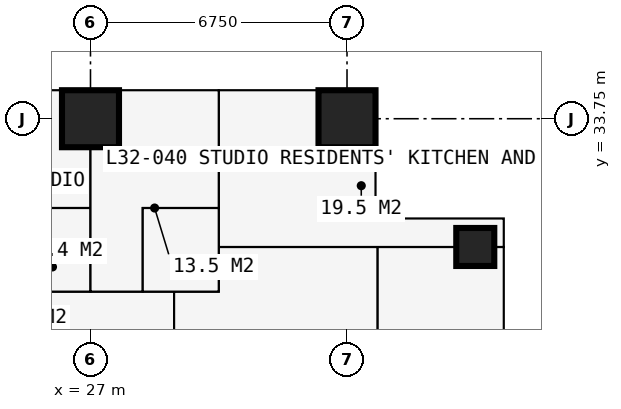
"""IFC4 building model, lengths in metres.
Left out: names, types, materials, properties, quantities, classifications, styles, units other than length and angle.
Written with IfcOpenShell. Run it as: python <this file> out.ifc"""

import sys

from ifc_helpers import new_model, si_unit, direction, frame, frame_2d, origin, origin_2d, place, context, subcontext, project, spatial, rectangle, extrude, element, fill, save


model = new_model("IFC4")
c1 = context("Model", 3, precision=1e-05, world=origin(), true_north=direction((0.0, 1.0)))
c2 = subcontext(c1, "Body", "Model", "MODEL_VIEW")
j1 = project(units=[si_unit("LENGTHUNIT", "METRE"), si_unit("PLANEANGLEUNIT", "RADIAN")], contexts=[c1])
p1 = place(None, origin())
s1 = spatial("IfcSite", under=j1, at=p1, CompositionType="ELEMENT")
p2 = place(p1, origin())
s2 = spatial("IfcBuilding", under=s1, at=p2, CompositionType="ELEMENT")
p3 = place(p2, frame((0.0, 0.0, 119.7)))
s3 = spatial("IfcBuildingStorey", under=s2, at=p3, CompositionType="ELEMENT", Elevation=119.7)
for number, where, z_axis, x_axis in (
    (1, (27.0, 33.75, 0.0), (0.0, 0.0, 1.0), (1.0, 0.0, 0.0)),
    (2, (33.75, 33.75, 0.0), (0.0, 0.0, 1.0), (1.0, 0.0, 0.0)),
):
    element("IfcColumn", number, at=place(p3, frame(where, z_axis=z_axis, x_axis=x_axis)), inside=s3, PredefinedType="COLUMN", context=c2, shape_type="SweptSolid", body=[
        extrude(rectangle(XDim=1.5, YDim=1.5, at=origin_2d()), origin(), (0.0, 0.0, 1.0), 3.6),
    ])
p4 = place(p3, frame((37.125, 30.375, 0.0), z_axis=(0.0, 0.0, 1.0), x_axis=(1.0, 0.0, 0.0)))
e3 = element("IfcColumn", 3, at=p4, inside=s3, PredefinedType="COLUMN", context=c2, shape_type="SweptSolid", body=[
    extrude(rectangle(XDim=1.0, YDim=1.0, at=origin_2d()), origin(), (0.0, 0.0, 1.0), 3.6),
])
p5 = place(p3, frame((37.875, 27.75, 0.0), z_axis=(0.0, 0.0, 1.0), x_axis=(0.0, 1.0, 0.0)))
e4 = element("IfcWall", 4, at=p5, inside=s3, PredefinedType="SOLIDWALL", context=c2, shape_type="SweptSolid", body=[
    extrude(rectangle(XDim=3.375, YDim=0.3, at=frame_2d((1.688, 0.0))), origin(), (0.0, 0.0, 1.0), 3.375),
])
p6 = place(p5, frame((0.788, 0.0, 0.6)))
e5 = element("IfcOpeningElement", 5, at=p6, cuts=e4, PredefinedType="OPENING", context=c2, shape_type="SweptSolid", body=[
    extrude(rectangle(XDim=1.8, YDim=2.1, at=frame_2d((0.9, 1.05))), frame((0.0, 0.16, 0.0), z_axis=(0.0, -1.0, 0.0), x_axis=(1.0, 0.0, 0.0)), (0.0, 0.0, 1.0), 0.32),
])
p7 = place(p3, frame((37.875, 31.125, 0.0), z_axis=(0.0, 0.0, 1.0), x_axis=(-1.0, 0.0, 0.0)))
e6 = element("IfcWall", 6, at=p7, inside=s3, PredefinedType="SOLIDWALL", context=c2, shape_type="SweptSolid", body=[
    extrude(rectangle(XDim=3.375, YDim=0.3, at=frame_2d((1.688, 0.0))), origin(), (0.0, 0.0, 1.0), 3.375),
])
p8 = place(p7, frame((0.788, 0.0, 0.6)))
e7 = element("IfcOpeningElement", 7, at=p8, cuts=e6, PredefinedType="OPENING", context=c2, shape_type="SweptSolid", body=[
    extrude(rectangle(XDim=1.8, YDim=2.1, at=frame_2d((0.9, 1.05))), frame((0.0, 0.16, 0.0), z_axis=(0.0, -1.0, 0.0), x_axis=(1.0, 0.0, 0.0)), (0.0, 0.0, 1.0), 0.32),
])
p9 = place(p3, frame((34.5, 31.125, 0.0), z_axis=(0.0, 0.0, 1.0), x_axis=(0.0, 1.0, 0.0)))
e8 = element("IfcWall", 8, at=p9, inside=s3, PredefinedType="SOLIDWALL", context=c2, shape_type="SweptSolid", body=[
    extrude(rectangle(XDim=3.375, YDim=0.3, at=frame_2d((1.688, 0.0))), origin(), (0.0, 0.0, 1.0), 3.375),
])
p10 = place(p9, frame((0.268, 0.0, 0.9)))
e9 = element("IfcOpeningElement", 9, at=p10, cuts=e8, PredefinedType="OPENING", context=c2, shape_type="SweptSolid", body=[
    extrude(rectangle(XDim=1.5, YDim=1.8, at=frame_2d((0.75, 0.9))), frame((0.0, 0.16, 0.0), z_axis=(0.0, -1.0, 0.0), x_axis=(1.0, 0.0, 0.0)), (0.0, 0.0, 1.0), 0.32),
])
p11 = place(p3, frame((20.25, 34.5, 0.0), z_axis=(0.0, 0.0, 1.0), x_axis=(1.0, 0.0, 0.0)))
e10 = element("IfcWall", 10, at=p11, inside=s3, PredefinedType="SOLIDWALL", context=c2, shape_type="SweptSolid", body=[
    extrude(rectangle(XDim=6.75, YDim=0.15, at=frame_2d((3.375, 0.0))), origin(), (0.0, 0.0, 1.0), 3.375),
])
p12 = place(p11, frame((0.863, 0.0, 0.0)))
e11 = element("IfcOpeningElement", 11, at=p12, cuts=e10, PredefinedType="OPENING", context=c2, shape_type="SweptSolid", body=[
    extrude(rectangle(XDim=1.0, YDim=2.2, at=frame_2d((0.5, 1.1))), frame((0.0, 0.085, 0.0), z_axis=(0.0, -1.0, 0.0), x_axis=(1.0, 0.0, 0.0)), (0.0, 0.0, 1.0), 0.17),
])
p13 = place(p11, frame((1.975, 0.0, 0.9)))
e12 = element("IfcOpeningElement", 12, at=p13, cuts=e10, PredefinedType="OPENING", context=c2, shape_type="SweptSolid", body=[
    extrude(rectangle(XDim=1.2, YDim=1.8, at=frame_2d((0.6, 0.9))), frame((0.0, 0.085, 0.0), z_axis=(0.0, -1.0, 0.0), x_axis=(1.0, 0.0, 0.0)), (0.0, 0.0, 1.0), 0.17),
])
p14 = place(p11, frame((4.887, 0.0, 0.0)))
e13 = element("IfcOpeningElement", 13, at=p14, cuts=e10, PredefinedType="OPENING", context=c2, shape_type="SweptSolid", body=[
    extrude(rectangle(XDim=1.0, YDim=2.2, at=frame_2d((0.5, 1.1))), frame((0.0, 0.085, 0.0), z_axis=(0.0, -1.0, 0.0), x_axis=(1.0, 0.0, 0.0)), (0.0, 0.0, 1.0), 0.17),
])
p15 = place(p11, frame((3.575, 0.0, 0.9)))
e14 = element("IfcOpeningElement", 14, at=p15, cuts=e10, PredefinedType="OPENING", context=c2, shape_type="SweptSolid", body=[
    extrude(rectangle(XDim=1.2, YDim=1.8, at=frame_2d((0.6, 0.9))), frame((0.0, 0.085, 0.0), z_axis=(0.0, -1.0, 0.0), x_axis=(1.0, 0.0, 0.0)), (0.0, 0.0, 1.0), 0.17),
])
p16 = place(p3, frame((11.3, 29.2, 0.0), z_axis=(0.0, 0.0, 1.0), x_axis=(1.0, 0.0, 0.0)))
e15 = element("IfcWall", 15, at=p16, inside=s3, PredefinedType="PARTITIONING", context=c2, shape_type="SweptSolid", body=[
    extrude(rectangle(XDim=19.075, YDim=0.15, at=frame_2d((9.538, 0.0))), origin(), (0.0, 0.0, 1.0), 3.375),
])
p17 = place(p16, frame((5.825, 0.0, 0.0)))
e16 = element("IfcOpeningElement", 16, at=p17, cuts=e15, PredefinedType="OPENING", context=c2, shape_type="SweptSolid", body=[
    extrude(rectangle(XDim=0.95, YDim=2.2, at=frame_2d((0.475, 1.1))), frame((0.0, 0.085, 0.0), z_axis=(0.0, -1.0, 0.0), x_axis=(1.0, 0.0, 0.0)), (0.0, 0.0, 1.0), 0.17),
])
p18 = place(p16, frame((9.2, 0.0, 0.0)))
e17 = element("IfcOpeningElement", 17, at=p18, cuts=e15, PredefinedType="OPENING", context=c2, shape_type="SweptSolid", body=[
    extrude(rectangle(XDim=0.95, YDim=2.2, at=frame_2d((0.475, 1.1))), frame((0.0, 0.085, 0.0), z_axis=(0.0, -1.0, 0.0), x_axis=(1.0, 0.0, 0.0)), (0.0, 0.0, 1.0), 0.17),
])
p19 = place(p16, frame((12.575, 0.0, 0.0)))
e18 = element("IfcOpeningElement", 18, at=p19, cuts=e15, PredefinedType="OPENING", context=c2, shape_type="SweptSolid", body=[
    extrude(rectangle(XDim=0.95, YDim=2.2, at=frame_2d((0.475, 1.1))), frame((0.0, 0.085, 0.0), z_axis=(0.0, -1.0, 0.0), x_axis=(1.0, 0.0, 0.0)), (0.0, 0.0, 1.0), 0.17),
])
p20 = place(p16, frame((15.95, 0.0, 0.0)))
e19 = element("IfcOpeningElement", 19, at=p20, cuts=e15, PredefinedType="OPENING", context=c2, shape_type="SweptSolid", body=[
    extrude(rectangle(XDim=0.95, YDim=2.2, at=frame_2d((0.475, 1.1))), frame((0.0, 0.085, 0.0), z_axis=(0.0, -1.0, 0.0), x_axis=(1.0, 0.0, 0.0)), (0.0, 0.0, 1.0), 0.17),
])
p21 = place(p16, frame((0.6, 0.0, 0.0)))
e20 = element("IfcOpeningElement", 20, at=p21, cuts=e15, PredefinedType="OPENING", context=c2, shape_type="SweptSolid", body=[
    extrude(rectangle(XDim=1.0, YDim=2.2, at=frame_2d((0.5, 1.1))), frame((0.0, 0.085, 0.0), z_axis=(0.0, -1.0, 0.0), x_axis=(1.0, 0.0, 0.0)), (0.0, 0.0, 1.0), 0.17),
])
p22 = place(p3, frame((25.0, 31.4, 0.0), z_axis=(0.0, 0.0, 1.0), x_axis=(1.0, 0.0, 0.0)))
e21 = element("IfcWall", 21, at=p22, inside=s3, PredefinedType="PARTITIONING", context=c2, shape_type="SweptSolid", body=[
    extrude(rectangle(XDim=2.0, YDim=0.1, at=frame_2d((1.0, 0.0))), origin(), (0.0, 0.0, 1.0), 3.375),
])
p23 = place(p3, frame((27.0, 29.2, 0.0), z_axis=(0.0, 0.0, 1.0), x_axis=(0.0, 1.0, 0.0)))
e22 = element("IfcWall", 22, at=p23, inside=s3, PredefinedType="PARTITIONING", context=c2, shape_type="SweptSolid", body=[
    extrude(rectangle(XDim=5.284, YDim=0.175, at=frame_2d((2.642, 0.0))), origin(), (0.0, 0.0, 1.0), 2.806),
])
p24 = place(p3, frame((28.375, 29.2, 0.0), z_axis=(0.0, 0.0, 1.0), x_axis=(0.0, 1.0, 0.0)))
e23 = element("IfcWall", 23, at=p24, inside=s3, PredefinedType="PARTITIONING", context=c2, shape_type="SweptSolid", body=[
    extrude(rectangle(XDim=2.2, YDim=0.1, at=frame_2d((1.1, 0.0))), origin(), (0.0, 0.0, 1.0), 3.375),
])
p25 = place(p24, frame((0.65, 0.0, 0.0)))
e24 = element("IfcOpeningElement", 24, at=p25, cuts=e23, PredefinedType="OPENING", context=c2, shape_type="SweptSolid", body=[
    extrude(rectangle(XDim=0.9, YDim=2.2, at=frame_2d((0.45, 1.1))), frame((0.0, 0.06, 0.0), z_axis=(0.0, -1.0, 0.0), x_axis=(1.0, 0.0, 0.0)), (0.0, 0.0, 1.0), 0.12),
])
p26 = place(p3, frame((28.375, 31.4, 0.0), z_axis=(0.0, 0.0, 1.0), x_axis=(1.0, 0.0, 0.0)))
e25 = element("IfcWall", 25, at=p26, inside=s3, PredefinedType="PARTITIONING", context=c2, shape_type="SweptSolid", body=[
    extrude(rectangle(XDim=2.0, YDim=0.1, at=frame_2d((1.0, 0.0))), origin(), (0.0, 0.0, 1.0), 3.375),
])
p27 = place(p3, frame((29.2, 11.3, 0.0), z_axis=(0.0, 0.0, 1.0), x_axis=(0.0, 1.0, 0.0)))
e26 = element("IfcWall", 26, at=p27, inside=s3, PredefinedType="PARTITIONING", context=c2, shape_type="SweptSolid", body=[
    extrude(rectangle(XDim=17.9, YDim=0.2, at=frame_2d((8.95, 0.0))), origin(), (0.0, 0.0, 1.0), 3.375),
])
p28 = place(p27, frame((8.35, 0.0, 0.0)))
e27 = element("IfcOpeningElement", 27, at=p28, cuts=e26, PredefinedType="OPENING", context=c2, shape_type="SweptSolid", body=[
    extrude(rectangle(XDim=1.2, YDim=2.2, at=frame_2d((0.6, 1.1))), frame((0.0, 0.11, 0.0), z_axis=(0.0, -1.0, 0.0), x_axis=(1.0, 0.0, 0.0)), (0.0, 0.0, 1.0), 0.22),
])
p29 = place(p3, frame((30.375, 29.2, 0.0), z_axis=(0.0, 0.0, 1.0), x_axis=(0.0, 1.0, 0.0)))
e28 = element("IfcWall", 28, at=p29, inside=s3, PredefinedType="PARTITIONING", context=c2, shape_type="SweptSolid", body=[
    extrude(rectangle(XDim=5.284, YDim=0.15, at=frame_2d((2.642, 0.0))), origin(), (0.0, 0.0, 1.0), 3.375),
])
p30 = place(p3, frame((30.375, 30.375, 0.0), z_axis=(0.0, 0.0, 1.0), x_axis=(1.0, 0.0, 0.0)))
e29 = element("IfcWall", 29, at=p30, inside=s3, PredefinedType="PARTITIONING", context=c2, shape_type="SweptSolid", body=[
    extrude(rectangle(XDim=7.35, YDim=0.15, at=frame_2d((3.675, 0.0))), origin(), (0.0, 0.0, 1.0), 2.877),
])
p31 = place(p30, frame((5.225, 0.0, 0.0)))
e30 = element("IfcOpeningElement", 30, at=p31, cuts=e29, PredefinedType="OPENING", context=c2, shape_type="SweptSolid", body=[
    extrude(rectangle(XDim=1.0, YDim=2.2, at=frame_2d((0.5, 1.1))), frame((0.0, 0.085, 0.0), z_axis=(0.0, -1.0, 0.0), x_axis=(1.0, 0.0, 0.0)), (0.0, 0.0, 1.0), 0.17),
])
p32 = place(p3, frame((34.55, 27.725, 0.0), z_axis=(0.0, 0.0, 1.0), x_axis=(0.0, 1.0, 0.0)))
e31 = element("IfcWall", 31, at=p32, inside=s3, PredefinedType="PARTITIONING", context=c2, shape_type="SweptSolid", body=[
    extrude(rectangle(XDim=2.65, YDim=0.15, at=frame_2d((1.325, 0.0))), origin(), (0.0, 0.0, 1.0), 3.375),
])
p33 = place(p6, origin())
e32 = element("IfcWindow", 32, at=p33, inside=s3, PartitioningType="SINGLE_PANEL", PredefinedType="WINDOW", context=c2, shape_type="SweptSolid", body=[
    extrude(rectangle(XDim=1.8, YDim=2.1, at=frame_2d((0.9, 1.05))), frame((0.0, 0.03, 0.0), z_axis=(0.0, -1.0, 0.0), x_axis=(1.0, 0.0, 0.0)), (0.0, 0.0, 1.0), 0.06),
])
fill(e5, e32)
p34 = place(p8, origin())
e33 = element("IfcWindow", 33, at=p34, inside=s3, PartitioningType="SINGLE_PANEL", PredefinedType="WINDOW", context=c2, shape_type="SweptSolid", body=[
    extrude(rectangle(XDim=1.8, YDim=2.1, at=frame_2d((0.9, 1.05))), frame((0.0, 0.03, 0.0), z_axis=(0.0, -1.0, 0.0), x_axis=(1.0, 0.0, 0.0)), (0.0, 0.0, 1.0), 0.06),
])
fill(e7, e33)
p35 = place(p10, origin())
e34 = element("IfcWindow", 34, at=p35, inside=s3, PartitioningType="SINGLE_PANEL", PredefinedType="WINDOW", context=c2, shape_type="SweptSolid", body=[
    extrude(rectangle(XDim=1.5, YDim=1.8, at=frame_2d((0.75, 0.9))), frame((0.0, 0.03, 0.0), z_axis=(0.0, -1.0, 0.0), x_axis=(1.0, 0.0, 0.0)), (0.0, 0.0, 1.0), 0.06),
])
fill(e9, e34)
p36 = place(p14, origin())
e35 = element("IfcDoor", 35, at=p36, inside=s3, OperationType="SINGLE_SWING_RIGHT", PredefinedType="DOOR", context=c2, shape_type="SweptSolid", body=[
    extrude(rectangle(XDim=1.0, YDim=2.2, at=frame_2d((0.5, 1.1))), frame((0.0, 0.025, 0.0), z_axis=(0.0, -1.0, 0.0), x_axis=(1.0, 0.0, 0.0)), (0.0, 0.0, 1.0), 0.05),
])
fill(e13, e35)
p37 = place(p31, origin())
e36 = element("IfcDoor", 36, at=p37, inside=s3, OperationType="SINGLE_SWING_LEFT", PredefinedType="DOOR", context=c2, shape_type="SweptSolid", body=[
    extrude(rectangle(XDim=1.0, YDim=2.2, at=frame_2d((0.5, 1.1))), frame((0.0, 0.025, 0.0), z_axis=(0.0, -1.0, 0.0), x_axis=(1.0, 0.0, 0.0)), (0.0, 0.0, 1.0), 0.05),
])
fill(e30, e36)
p38 = place(p20, origin())
e37 = element("IfcDoor", 37, at=p38, inside=s3, OperationType="SINGLE_SWING_LEFT", PredefinedType="DOOR", context=c2, shape_type="SweptSolid", body=[
    extrude(rectangle(XDim=0.95, YDim=2.2, at=frame_2d((0.475, 1.1))), frame((0.0, 0.025, 0.0), z_axis=(0.0, -1.0, 0.0), x_axis=(1.0, 0.0, 0.0)), (0.0, 0.0, 1.0), 0.05),
])
fill(e19, e37)
p39 = place(p25, origin())
e38 = element("IfcDoor", 38, at=p39, inside=s3, OperationType="SINGLE_SWING_RIGHT", PredefinedType="DOOR", context=c2, shape_type="SweptSolid", body=[
    extrude(rectangle(XDim=0.9, YDim=2.2, at=frame_2d((0.45, 1.1))), frame((0.0, 0.025, 0.0), z_axis=(0.0, -1.0, 0.0), x_axis=(1.0, 0.0, 0.0)), (0.0, 0.0, 1.0), 0.05),
])
fill(e24, e38)
save(model, sys.argv[1])
